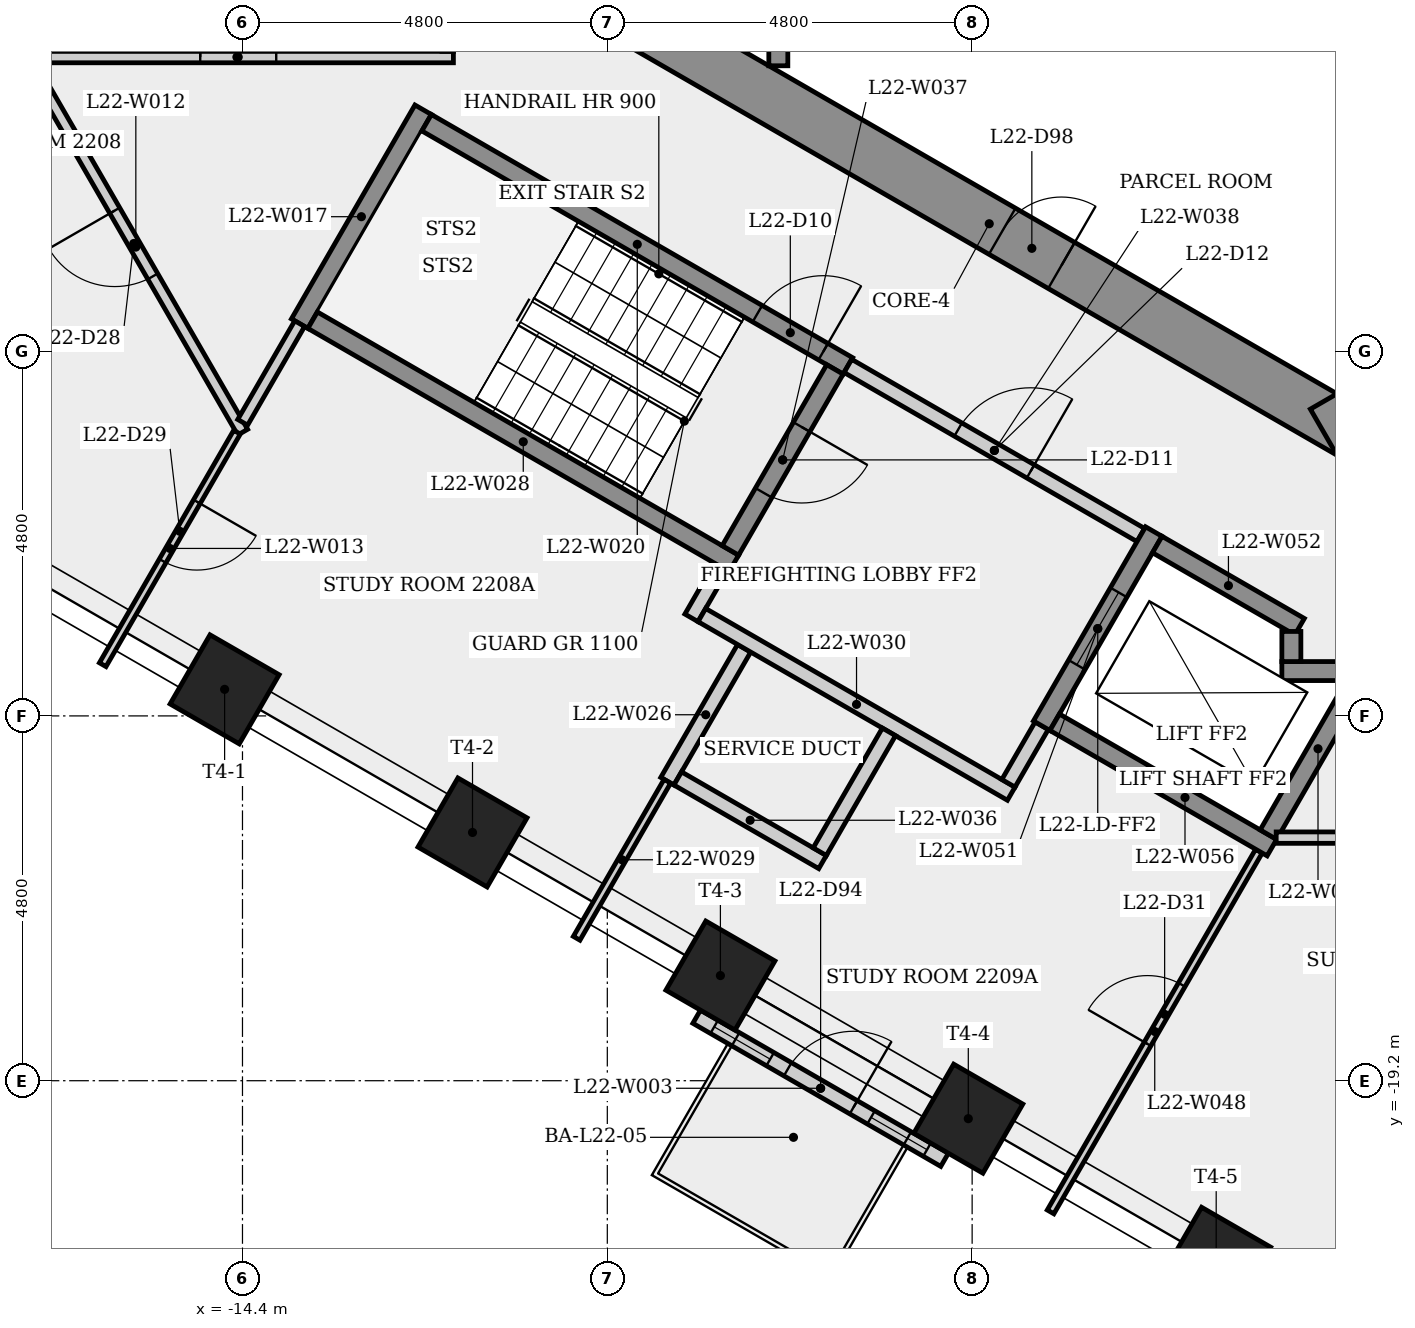
"""IFC4 building model, lengths in metres.
Left out: names, types, materials, properties, quantities, classifications, styles, units other than length and angle.
Written with IfcOpenShell. Run it as: python <this file> out.ifc"""

import sys

from ifc_helpers import new_model, si_unit, direction, frame, frame_2d, origin, origin_2d, place, context, subcontext, project, spatial, rectangle, extrude, element, fill, save


model = new_model("IFC4")
c1 = context("Model", 3, precision=1e-05, world=origin(), true_north=direction((0.0, 1.0)))
c2 = subcontext(c1, "Body", "Model", "MODEL_VIEW")
j1 = project(units=[si_unit("LENGTHUNIT", "METRE"), si_unit("PLANEANGLEUNIT", "RADIAN")], contexts=[c1])
p1 = place(None, origin())
s1 = spatial("IfcSite", under=j1, at=p1, CompositionType="ELEMENT")
p2 = place(p1, origin())
s2 = spatial("IfcBuilding", under=s1, at=p2, CompositionType="ELEMENT")
p3 = place(p2, frame((0.0, 0.0, 86.5)))
s3 = spatial("IfcBuildingStorey", under=s2, at=p3, CompositionType="ELEMENT", Elevation=86.5)
p4 = place(p3, frame((-9.325, -5.182, 0.0), z_axis=(0.0, 0.0, 1.0), x_axis=(0.866023993627, -0.500002442456, 0.0)))
e1 = element("IfcWall", 1, at=p4, inside=s3, PredefinedType="SHEAR", context=c2, shape_type="SweptSolid", body=[
    extrude(rectangle(XDim=10.97, YDim=0.7, at=frame_2d((5.485, 0.0))), origin(), (0.0, 0.0, 1.0), 3.4),
])
p5 = place(p4, frame((5.682, 0.0, 0.0)))
e2 = element("IfcOpeningElement", 2, at=p5, cuts=e1, PredefinedType="OPENING", context=c2, shape_type="SweptSolid", body=[
    extrude(rectangle(XDim=0.9, YDim=2.1, at=frame_2d((0.45, 1.05))), frame((0.0, 0.36, 0.0), z_axis=(0.0, -1.0, 0.0), x_axis=(1.0, 0.0, 0.0)), (0.0, 0.0, 1.0), 0.72),
])
p6 = place(p3, frame((-0.175, -10.667, 0.0), z_axis=(0.0, 0.0, 1.0), x_axis=(0.866023993627, 0.500002442456, 0.0)))
e3 = element("IfcWall", 3, at=p6, inside=s3, PredefinedType="SHEAR", context=c2, shape_type="SweptSolid", body=[
    extrude(rectangle(XDim=10.97, YDim=0.7, at=frame_2d((5.485, 0.0))), origin(), (0.0, 0.0, 1.0), 3.4),
])
p7 = place(p6, frame((7.252, 0.0, 0.0)))
e4 = element("IfcOpeningElement", 4, at=p7, cuts=e3, PredefinedType="OPENING", context=c2, shape_type="SweptSolid", body=[
    extrude(rectangle(XDim=0.9, YDim=2.1, at=frame_2d((0.45, 1.05))), frame((0.0, 0.36, 0.0), z_axis=(0.0, -1.0, 0.0), x_axis=(1.0, 0.0, 0.0)), (0.0, 0.0, 1.0), 0.72),
])
for number, where, z_axis, x_axis in (
    (5, (-14.635, -14.051, 0.0), (0.0, 0.0, 1.0), (-0.5, -0.866, 0.0)),
    (6, (-11.374, -15.934, 0.0), (0.0, 0.0, 1.0), (-0.5, -0.866, 0.0)),
    (7, (-8.112, -17.816, 0.0), (0.0, 0.0, 1.0), (-0.5, -0.866, 0.0)),
    (8, (-4.851, -19.699, 0.0), (0.0, 0.0, 1.0), (-0.5, -0.866, 0.0)),
    (9, (-1.589, -21.583, 0.0), (0.0, 0.0, 1.0), (-0.5, -0.866, 0.0)),
):
    element("IfcColumn", number, at=place(p3, frame(where, z_axis=z_axis, x_axis=x_axis)), inside=s3, PredefinedType="COLUMN", context=c2, shape_type="SweptSolid", body=[
        extrude(rectangle(XDim=1.05, YDim=1.05, at=origin_2d()), origin(), (0.0, 0.0, 1.0), 3.4),
    ])
p8 = place(p3, frame((-8.424, -18.358, 0.0), z_axis=(0.0, 0.0, 1.0), x_axis=(0.866020414047, -0.500008642379, 0.0)))
e10 = element("IfcWall", 10, at=p8, inside=s3, PredefinedType="SOLIDWALL", context=c2, shape_type="SweptSolid", body=[
    extrude(rectangle(XDim=3.766, YDim=0.2, at=frame_2d((1.883, 0.0))), origin(), (0.0, 0.0, 1.0), 3.4),
])
p9 = place(p8, frame((1.383, 0.0, 0.0)))
e11 = element("IfcOpeningElement", 11, at=p9, cuts=e10, PredefinedType="OPENING", context=c2, shape_type="SweptSolid", body=[
    extrude(rectangle(XDim=1.0, YDim=2.4, at=frame_2d((0.5, 1.2))), frame((0.0, 0.11, 0.0), z_axis=(0.0, -1.0, 0.0), x_axis=(1.0, 0.0, 0.0)), (0.0, 0.0, 1.0), 0.22),
])
p10 = place(p8, frame((0.267, 0.0, 0.9)))
e12 = element("IfcOpeningElement", 12, at=p10, cuts=e10, PredefinedType="OPENING", context=c2, shape_type="SweptSolid", body=[
    extrude(rectangle(XDim=0.85, YDim=1.5, at=frame_2d((0.425, 0.75))), frame((0.0, 0.11, 0.0), z_axis=(0.0, -1.0, 0.0), x_axis=(1.0, 0.0, 0.0)), (0.0, 0.0, 1.0), 0.22),
])
p11 = place(p8, frame((2.649, 0.0, 0.9)))
e13 = element("IfcOpeningElement", 13, at=p11, cuts=e10, PredefinedType="OPENING", context=c2, shape_type="SweptSolid", body=[
    extrude(rectangle(XDim=0.85, YDim=1.5, at=frame_2d((0.425, 0.75))), frame((0.0, 0.11, 0.0), z_axis=(0.0, -1.0, 0.0), x_axis=(1.0, 0.0, 0.0)), (0.0, 0.0, 1.0), 0.22),
])
p12 = place(p3, frame((-17.322, -5.731, 0.0), z_axis=(0.0, 0.0, 1.0), x_axis=(1.0, 0.0, 0.0)))
e14 = element("IfcWall", 14, at=p12, inside=s3, PredefinedType="PARTITIONING", context=c2, shape_type="SweptSolid", body=[
    extrude(rectangle(XDim=5.697, YDim=0.15, at=frame_2d((2.848, 0.0))), origin(), (0.0, 0.0, 1.0), 3.05),
])
p13 = place(p12, frame((2.365, 0.0, 0.0)))
e15 = element("IfcOpeningElement", 15, at=p13, cuts=e14, PredefinedType="OPENING", context=c2, shape_type="SweptSolid", body=[
    extrude(rectangle(XDim=1.0, YDim=2.1, at=frame_2d((0.5, 1.05))), frame((0.0, 0.085, 0.0), z_axis=(0.0, -1.0, 0.0), x_axis=(1.0, 0.0, 0.0)), (0.0, 0.0, 1.0), 0.17),
])
p14 = place(p3, frame((-14.397, -10.667, 0.0), z_axis=(0.0, 0.0, 1.0), x_axis=(-0.500000548001, 0.866025087395, 0.0)))
e16 = element("IfcWall", 16, at=p14, inside=s3, PredefinedType="PARTITIONING", context=c2, shape_type="SweptSolid", body=[
    extrude(rectangle(XDim=5.624, YDim=0.15, at=frame_2d((2.812, 0.0))), origin(), (0.0, 0.0, 1.0), 3.05),
])
p15 = place(p14, frame((2.367, 0.0, 0.0)))
e17 = element("IfcOpeningElement", 17, at=p15, cuts=e16, PredefinedType="OPENING", context=c2, shape_type="SweptSolid", body=[
    extrude(rectangle(XDim=1.0, YDim=2.1, at=frame_2d((0.5, 1.05))), frame((0.0, 0.085, 0.0), z_axis=(0.0, -1.0, 0.0), x_axis=(1.0, 0.0, 0.0)), (0.0, 0.0, 1.0), 0.17),
])
p16 = place(p3, frame((-14.472, -10.667, 0.0), z_axis=(0.0, 0.0, 1.0), x_axis=(-0.500003579843, -0.866023336951, 0.0)))
e18 = element("IfcWall", 18, at=p16, inside=s3, PredefinedType="PARTITIONING", context=c2, shape_type="SweptSolid", body=[
    extrude(rectangle(XDim=3.533, YDim=0.1, at=frame_2d((1.767, 0.0))), origin(), (0.0, 0.0, 1.0), 3.05),
])
p17 = place(p16, frame((1.056, 0.0, 0.0)))
e19 = element("IfcOpeningElement", 19, at=p17, cuts=e18, PredefinedType="OPENING", context=c2, shape_type="SweptSolid", body=[
    extrude(rectangle(XDim=0.9, YDim=2.1, at=frame_2d((0.45, 1.05))), frame((0.0, 0.06, 0.0), z_axis=(0.0, -1.0, 0.0), x_axis=(1.0, 0.0, 0.0)), (0.0, 0.0, 1.0), 0.12),
])
p18 = place(p3, frame((-13.648, -9.239, 0.0), z_axis=(0.0, 0.0, 1.0), x_axis=(0.500017246033, 0.866015446554, 0.0)))
e20 = element("IfcWall", 20, at=p18, inside=s3, PredefinedType="SHEAR", context=c2, shape_type="SweptSolid", body=[
    extrude(rectangle(XDim=3.25, YDim=0.25, at=frame_2d((1.625, 0.0))), origin(), (0.0, 0.0, 1.0), 3.05),
])
p19 = place(p3, frame((-13.648, -9.239, 0.0), z_axis=(0.0, 0.0, 1.0), x_axis=(-0.500098465136, -0.865968547448, 0.0)))
e21 = element("IfcWall", 21, at=p19, inside=s3, PredefinedType="PARTITIONING", context=c2, shape_type="SweptSolid", body=[
    extrude(rectangle(XDim=1.499, YDim=0.15, at=frame_2d((0.75, 0.0))), origin(), (0.0, 0.0, 1.0), 3.05),
])
p20 = place(p3, frame((-11.977, -6.595, 0.0), z_axis=(0.0, 0.0, 1.0), x_axis=(0.866025499775, -0.499999833739, 0.0)))
e22 = element("IfcWall", 22, at=p20, inside=s3, PredefinedType="SHEAR", context=c2, shape_type="SweptSolid", body=[
    extrude(rectangle(XDim=6.4, YDim=0.25, at=frame_2d((3.2, 0.0))), origin(), (0.0, 0.0, 1.0), 3.05),
])
p21 = place(p20, frame((5.025, 0.0, 0.0)))
e23 = element("IfcOpeningElement", 23, at=p21, cuts=e22, PredefinedType="OPENING", context=c2, shape_type="SweptSolid", body=[
    extrude(rectangle(XDim=1.0, YDim=2.1, at=frame_2d((0.5, 1.05))), frame((0.0, 0.135, 0.0), z_axis=(0.0, -1.0, 0.0), x_axis=(1.0, 0.0, 0.0)), (0.0, 0.0, 1.0), 0.27),
])
p22 = place(p3, frame((-8.81, -15.26, 0.0), z_axis=(0.0, 0.0, 1.0), x_axis=(0.499973530083, 0.866040685659, 0.0)))
e24 = element("IfcWall", 24, at=p22, inside=s3, PredefinedType="PLUMBINGWALL", context=c2, shape_type="SweptSolid", body=[
    extrude(rectangle(XDim=2.02, YDim=0.2, at=frame_2d((1.01, 0.0))), origin(), (0.0, 0.0, 1.0), 3.05),
])
p23 = place(p3, frame((-8.493, -13.11, 0.0), z_axis=(0.0, 0.0, 1.0), x_axis=(0.500067724834, 0.865986299303, 0.0)))
e25 = element("IfcWall", 25, at=p23, inside=s3, PredefinedType="PARTITIONING", context=c2, shape_type="SweptSolid", body=[
    extrude(rectangle(XDim=0.775, YDim=0.2, at=frame_2d((0.388, 0.0))), origin(), (0.0, 0.0, 1.0), 3.05),
])
p24 = place(p3, frame((-7.935, -12.393, 0.0), z_axis=(0.0, 0.0, 1.0), x_axis=(-0.866025499775, 0.499999833739, 0.0)))
e26 = element("IfcWall", 26, at=p24, inside=s3, PredefinedType="SHEAR", context=c2, shape_type="SweptSolid", body=[
    extrude(rectangle(XDim=6.4, YDim=0.25, at=frame_2d((3.2, 0.0))), origin(), (0.0, 0.0, 1.0), 3.05),
])
p25 = place(p3, frame((-10.003, -17.326, 0.0), z_axis=(0.0, 0.0, 1.0), x_axis=(0.500056007527, 0.865993065409, 0.0)))
e27 = element("IfcWall", 27, at=p25, inside=s3, PredefinedType="PARTITIONING", context=c2, shape_type="SweptSolid", body=[
    extrude(rectangle(XDim=2.386, YDim=0.1, at=frame_2d((1.193, 0.0))), origin(), (0.0, 0.0, 1.0), 3.05),
])
p26 = place(p3, frame((-8.356, -13.073, 0.0), z_axis=(0.0, 0.0, 1.0), x_axis=(0.866038532462, -0.499977259774, 0.0)))
e28 = element("IfcWall", 28, at=p26, inside=s3, PredefinedType="PARTITIONING", context=c2, shape_type="SweptSolid", body=[
    extrude(rectangle(XDim=4.7, YDim=0.2, at=frame_2d((2.35, 0.0))), origin(), (0.0, 0.0, 1.0), 3.05),
])
p27 = place(p3, frame((-7.35, -5.846, 0.0), z_axis=(0.0, 0.0, 1.0), x_axis=(0.0, 1.0, 0.0)))
e29 = element("IfcWall", 29, at=p27, inside=s3, PredefinedType="SHEAR", context=c2, shape_type="SweptSolid", body=[
    extrude(rectangle(XDim=4.171, YDim=0.25, at=frame_2d((2.085, 0.0))), origin(), (0.0, 0.0, 1.0), 3.05),
])
p28 = place(p3, frame((-6.768, -16.323, 0.0), z_axis=(0.0, 0.0, 1.0), x_axis=(-0.866008176907, 0.50002983664, 0.0)))
e30 = element("IfcWall", 30, at=p28, inside=s3, PredefinedType="PLUMBINGWALL", context=c2, shape_type="SweptSolid", body=[
    extrude(rectangle(XDim=2.2, YDim=0.2, at=frame_2d((1.1, 0.0))), origin(), (0.0, 0.0, 1.0), 3.05),
])
p29 = place(p3, frame((-6.605, -9.841, 0.0), z_axis=(0.0, 0.0, 1.0), x_axis=(-0.499996545922, -0.866027397988, 0.0)))
e31 = element("IfcWall", 31, at=p29, inside=s3, PredefinedType="SHEAR", context=c2, shape_type="SweptSolid", body=[
    extrude(rectangle(XDim=2.75, YDim=0.25, at=frame_2d((1.375, 0.0))), origin(), (0.0, 0.0, 1.0), 3.05),
])
p30 = place(p29, frame((0.875, 0.0, 0.0)))
e32 = element("IfcOpeningElement", 32, at=p30, cuts=e31, PredefinedType="OPENING", context=c2, shape_type="SweptSolid", body=[
    extrude(rectangle(XDim=1.0, YDim=2.1, at=frame_2d((0.5, 1.05))), frame((0.0, 0.135, 0.0), z_axis=(0.0, -1.0, 0.0), x_axis=(1.0, 0.0, 0.0)), (0.0, 0.0, 1.0), 0.27),
])
p31 = place(p3, frame((-6.435, -9.795, 0.0), z_axis=(0.0, 0.0, 1.0), x_axis=(0.866012907634, -0.500021643343, 0.0)))
e33 = element("IfcWall", 33, at=p31, inside=s3, PredefinedType="PARTITIONING", context=c2, shape_type="SweptSolid", body=[
    extrude(rectangle(XDim=4.45, YDim=0.2, at=frame_2d((2.225, 0.0))), origin(), (0.0, 0.0, 1.0), 3.05),
])
p32 = place(p31, frame((1.675, 0.0, 0.0)))
e34 = element("IfcOpeningElement", 34, at=p32, cuts=e33, PredefinedType="OPENING", context=c2, shape_type="SweptSolid", body=[
    extrude(rectangle(XDim=1.1, YDim=2.1, at=frame_2d((0.55, 1.05))), frame((0.0, 0.11, 0.0), z_axis=(0.0, -1.0, 0.0), x_axis=(1.0, 0.0, 0.0)), (0.0, 0.0, 1.0), 0.22),
])
p33 = place(p3, frame((-5.895, -14.61, 0.0), z_axis=(0.0, 0.0, 1.0), x_axis=(-0.499962438169, -0.866047089031, 0.0)))
e35 = element("IfcWall", 35, at=p33, inside=s3, PredefinedType="PLUMBINGWALL", context=c2, shape_type="SweptSolid", body=[
    extrude(rectangle(XDim=1.82, YDim=0.2, at=frame_2d((0.91, 0.0))), origin(), (0.0, 0.0, 1.0), 3.05),
])
p34 = place(p3, frame((-3.885, -14.529, 0.0), z_axis=(0.0, 0.0, 1.0), x_axis=(-0.499859285417, -0.866106630146, 0.0)))
e36 = element("IfcWall", 36, at=p34, inside=s3, PredefinedType="PARTITIONING", context=c2, shape_type="SweptSolid", body=[
    extrude(rectangle(XDim=0.875, YDim=0.2, at=frame_2d((0.438, 0.0))), origin(), (0.0, 0.0, 1.0), 3.05),
])
p35 = place(p3, frame((-3.768, -20.926, 0.0), z_axis=(0.0, 0.0, 1.0), x_axis=(0.499980760091, 0.866036511666, 0.0)))
e37 = element("IfcWall", 37, at=p35, inside=s3, PredefinedType="PARTITIONING", context=c2, shape_type="SweptSolid", body=[
    extrude(rectangle(XDim=5.482, YDim=0.1, at=frame_2d((2.741, 0.0))), origin(), (0.0, 0.0, 1.0), 3.05),
])
p36 = place(p35, frame((2.551, 0.0, 0.0)))
e38 = element("IfcOpeningElement", 38, at=p36, cuts=e37, PredefinedType="OPENING", context=c2, shape_type="SweptSolid", body=[
    extrude(rectangle(XDim=0.9, YDim=2.1, at=frame_2d((0.45, 1.05))), frame((0.0, 0.06, 0.0), z_axis=(0.0, -1.0, 0.0), x_axis=(1.0, 0.0, 0.0)), (0.0, 0.0, 1.0), 0.12),
])
p37 = place(p3, frame((-2.41, -11.974, 0.0), z_axis=(0.0, 0.0, 1.0), x_axis=(-0.500001826776, -0.866024349092, 0.0)))
e39 = element("IfcWall", 39, at=p37, inside=s3, PredefinedType="SHEAR", context=c2, shape_type="SweptSolid", body=[
    extrude(rectangle(XDim=2.95, YDim=0.25, at=frame_2d((1.475, 0.0))), origin(), (0.0, 0.0, 1.0), 3.05),
])
p38 = place(p37, frame((0.925, 0.0, 0.0)))
e40 = element("IfcOpeningElement", 40, at=p38, cuts=e39, PredefinedType="OPENING", context=c2, shape_type="SweptSolid", body=[
    extrude(rectangle(XDim=1.1, YDim=2.1, at=frame_2d((0.55, 1.05))), frame((0.0, 0.135, 0.0), z_axis=(0.0, -1.0, 0.0), x_axis=(1.0, 0.0, 0.0)), (0.0, 0.0, 1.0), 0.27),
])
p39 = place(p3, frame((-2.364, -12.145, 0.0), z_axis=(0.0, 0.0, 1.0), x_axis=(0.86603892542, -0.499976579108, 0.0)))
e41 = element("IfcWall", 41, at=p39, inside=s3, PredefinedType="SHEAR", context=c2, shape_type="SweptSolid", body=[
    extrude(rectangle(XDim=2.162, YDim=0.25, at=frame_2d((1.081, 0.0))), origin(), (0.0, 0.0, 1.0), 3.05),
])
p40 = place(p3, frame((-0.856, -16.133, 0.0), z_axis=(0.0, 0.0, 1.0), x_axis=(-0.866021716278, 0.500006386895, 0.0)))
e42 = element("IfcWall", 42, at=p40, inside=s3, PredefinedType="SHEAR", context=c2, shape_type="SweptSolid", body=[
    extrude(rectangle(XDim=3.3, YDim=0.25, at=frame_2d((1.65, 0.0))), origin(), (0.0, 0.0, 1.0), 3.05),
])
p41 = place(p3, frame((-0.902, -15.962, 0.0), z_axis=(0.0, 0.0, 1.0), x_axis=(0.499981517636, 0.866036074319, 0.0)))
e43 = element("IfcWall", 43, at=p41, inside=s3, PredefinedType="SHEAR", context=c2, shape_type="SweptSolid", body=[
    extrude(rectangle(XDim=2.61, YDim=0.25, at=frame_2d((1.305, 0.0))), origin(), (0.0, 0.0, 1.0), 3.05),
])
p42 = place(p3, frame((-0.725, -13.81, 0.0), z_axis=(0.0, 0.0, 1.0), x_axis=(1.0, 0.0, 0.0)))
e44 = element("IfcWall", 44, at=p42, inside=s3, PredefinedType="SHEAR", context=c2, shape_type="SweptSolid", body=[
    extrude(rectangle(XDim=0.941, YDim=0.25, at=frame_2d((0.47, 0.0))), origin(), (0.0, 0.0, 1.0), 3.4),
])
p43 = place(p3, frame((-0.6, -13.289, 0.0), z_axis=(0.0, 0.0, 1.0), x_axis=(0.0, -1.0, 0.0)))
e45 = element("IfcWall", 45, at=p43, inside=s3, PredefinedType="SHEAR", context=c2, shape_type="SweptSolid", body=[
    extrude(rectangle(XDim=0.396, YDim=0.25, at=frame_2d((0.198, 0.0))), origin(), (0.0, 0.0, 1.0), 3.4),
])
p44 = place(p3, frame((3.621, -16.002, 0.0), z_axis=(0.0, 0.0, 1.0), x_axis=(-1.0, 0.0, 0.0)))
e46 = element("IfcWall", 46, at=p44, inside=s3, PredefinedType="PARTITIONING", context=c2, shape_type="SweptSolid", body=[
    extrude(rectangle(XDim=4.421, YDim=0.15, at=frame_2d((2.21, 0.0))), origin(), (0.0, 0.0, 1.0), 3.05),
])
p45 = place(p44, frame((1.71, 0.0, 0.0)))
e47 = element("IfcOpeningElement", 47, at=p45, cuts=e46, PredefinedType="OPENING", context=c2, shape_type="SweptSolid", body=[
    extrude(rectangle(XDim=1.0, YDim=2.1, at=frame_2d((0.5, 1.05))), frame((0.0, 0.085, 0.0), z_axis=(0.0, -1.0, 0.0), x_axis=(1.0, 0.0, 0.0)), (0.0, 0.0, 1.0), 0.17),
])
p46 = place(p9, origin())
e48 = element("IfcDoor", 48, at=p46, inside=s3, OperationType="SINGLE_SWING_RIGHT", PredefinedType="DOOR", context=c2, shape_type="SweptSolid", body=[
    extrude(rectangle(XDim=1.0, YDim=2.4, at=frame_2d((0.5, 1.2))), frame((0.0, 0.025, 0.0), z_axis=(0.0, -1.0, 0.0), x_axis=(1.0, 0.0, 0.0)), (0.0, 0.0, 1.0), 0.05),
])
fill(e11, e48)
p47 = place(p10, origin())
e49 = element("IfcWindow", 49, at=p47, inside=s3, PartitioningType="SINGLE_PANEL", PredefinedType="WINDOW", context=c2, shape_type="SweptSolid", body=[
    extrude(rectangle(XDim=0.85, YDim=1.5, at=frame_2d((0.425, 0.75))), frame((0.0, 0.03, 0.0), z_axis=(0.0, -1.0, 0.0), x_axis=(1.0, 0.0, 0.0)), (0.0, 0.0, 1.0), 0.06),
])
fill(e12, e49)
p48 = place(p11, origin())
e50 = element("IfcWindow", 50, at=p48, inside=s3, PartitioningType="SINGLE_PANEL", PredefinedType="WINDOW", context=c2, shape_type="SweptSolid", body=[
    extrude(rectangle(XDim=0.85, YDim=1.5, at=frame_2d((0.425, 0.75))), frame((0.0, 0.03, 0.0), z_axis=(0.0, -1.0, 0.0), x_axis=(1.0, 0.0, 0.0)), (0.0, 0.0, 1.0), 0.06),
])
fill(e13, e50)
p49 = place(p21, origin())
e51 = element("IfcDoor", 51, at=p49, inside=s3, OperationType="SINGLE_SWING_RIGHT", PredefinedType="DOOR", context=c2, shape_type="SweptSolid", body=[
    extrude(rectangle(XDim=1.0, YDim=2.1, at=frame_2d((0.5, 1.05))), frame((0.0, 0.025, 0.0), z_axis=(0.0, -1.0, 0.0), x_axis=(1.0, 0.0, 0.0)), (0.0, 0.0, 1.0), 0.05),
])
fill(e23, e51)
p50 = place(p30, origin())
e52 = element("IfcDoor", 52, at=p50, inside=s3, OperationType="SINGLE_SWING_LEFT", PredefinedType="DOOR", context=c2, shape_type="SweptSolid", body=[
    extrude(rectangle(XDim=1.0, YDim=2.1, at=frame_2d((0.5, 1.05))), frame((0.0, 0.025, 0.0), z_axis=(0.0, -1.0, 0.0), x_axis=(1.0, 0.0, 0.0)), (0.0, 0.0, 1.0), 0.05),
])
fill(e32, e52)
p51 = place(p32, origin())
e53 = element("IfcDoor", 53, at=p51, inside=s3, OperationType="SINGLE_SWING_RIGHT", PredefinedType="DOOR", context=c2, shape_type="SweptSolid", body=[
    extrude(rectangle(XDim=1.1, YDim=2.1, at=frame_2d((0.55, 1.05))), frame((0.0, 0.025, 0.0), z_axis=(0.0, -1.0, 0.0), x_axis=(1.0, 0.0, 0.0)), (0.0, 0.0, 1.0), 0.05),
])
fill(e34, e53)
p52 = place(p38, origin())
e54 = element("IfcDoor", 54, at=p52, inside=s3, OperationType="SLIDING_TO_LEFT", PredefinedType="DOOR", context=c2, shape_type="SweptSolid", body=[
    extrude(rectangle(XDim=1.1, YDim=2.1, at=frame_2d((0.55, 1.05))), frame((0.0, 0.025, 0.0), z_axis=(0.0, -1.0, 0.0), x_axis=(1.0, 0.0, 0.0)), (0.0, 0.0, 1.0), 0.05),
])
fill(e40, e54)
p53 = place(p13, origin())
e55 = element("IfcDoor", 55, at=p53, inside=s3, OperationType="SINGLE_SWING_LEFT", PredefinedType="DOOR", context=c2, shape_type="SweptSolid", body=[
    extrude(rectangle(XDim=1.0, YDim=2.1, at=frame_2d((0.5, 1.05))), frame((0.0, 0.025, 0.0), z_axis=(0.0, -1.0, 0.0), x_axis=(1.0, 0.0, 0.0)), (0.0, 0.0, 1.0), 0.05),
])
fill(e15, e55)
p54 = place(p15, origin())
e56 = element("IfcDoor", 56, at=p54, inside=s3, OperationType="SINGLE_SWING_RIGHT", PredefinedType="DOOR", context=c2, shape_type="SweptSolid", body=[
    extrude(rectangle(XDim=1.0, YDim=2.1, at=frame_2d((0.5, 1.05))), frame((0.0, 0.025, 0.0), z_axis=(0.0, -1.0, 0.0), x_axis=(1.0, 0.0, 0.0)), (0.0, 0.0, 1.0), 0.05),
])
fill(e17, e56)
p55 = place(p17, origin())
e57 = element("IfcDoor", 57, at=p55, inside=s3, OperationType="SINGLE_SWING_LEFT", PredefinedType="DOOR", context=c2, shape_type="SweptSolid", body=[
    extrude(rectangle(XDim=0.9, YDim=2.1, at=frame_2d((0.45, 1.05))), frame((0.0, 0.025, 0.0), z_axis=(0.0, -1.0, 0.0), x_axis=(1.0, 0.0, 0.0)), (0.0, 0.0, 1.0), 0.05),
])
fill(e19, e57)
p56 = place(p36, origin())
e58 = element("IfcDoor", 58, at=p56, inside=s3, OperationType="SINGLE_SWING_LEFT", PredefinedType="DOOR", context=c2, shape_type="SweptSolid", body=[
    extrude(rectangle(XDim=0.9, YDim=2.1, at=frame_2d((0.45, 1.05))), frame((0.0, 0.025, 0.0), z_axis=(0.0, -1.0, 0.0), x_axis=(1.0, 0.0, 0.0)), (0.0, 0.0, 1.0), 0.05),
])
fill(e38, e58)
p57 = place(p5, origin())
e59 = element("IfcDoor", 59, at=p57, inside=s3, OperationType="SINGLE_SWING_RIGHT", PredefinedType="DOOR", context=c2, shape_type="SweptSolid", body=[
    extrude(rectangle(XDim=0.9, YDim=2.1, at=frame_2d((0.45, 1.05))), frame((0.0, 0.025, 0.0), z_axis=(0.0, -1.0, 0.0), x_axis=(1.0, 0.0, 0.0)), (0.0, 0.0, 1.0), 0.05),
])
fill(e2, e59)
save(model, sys.argv[1])
